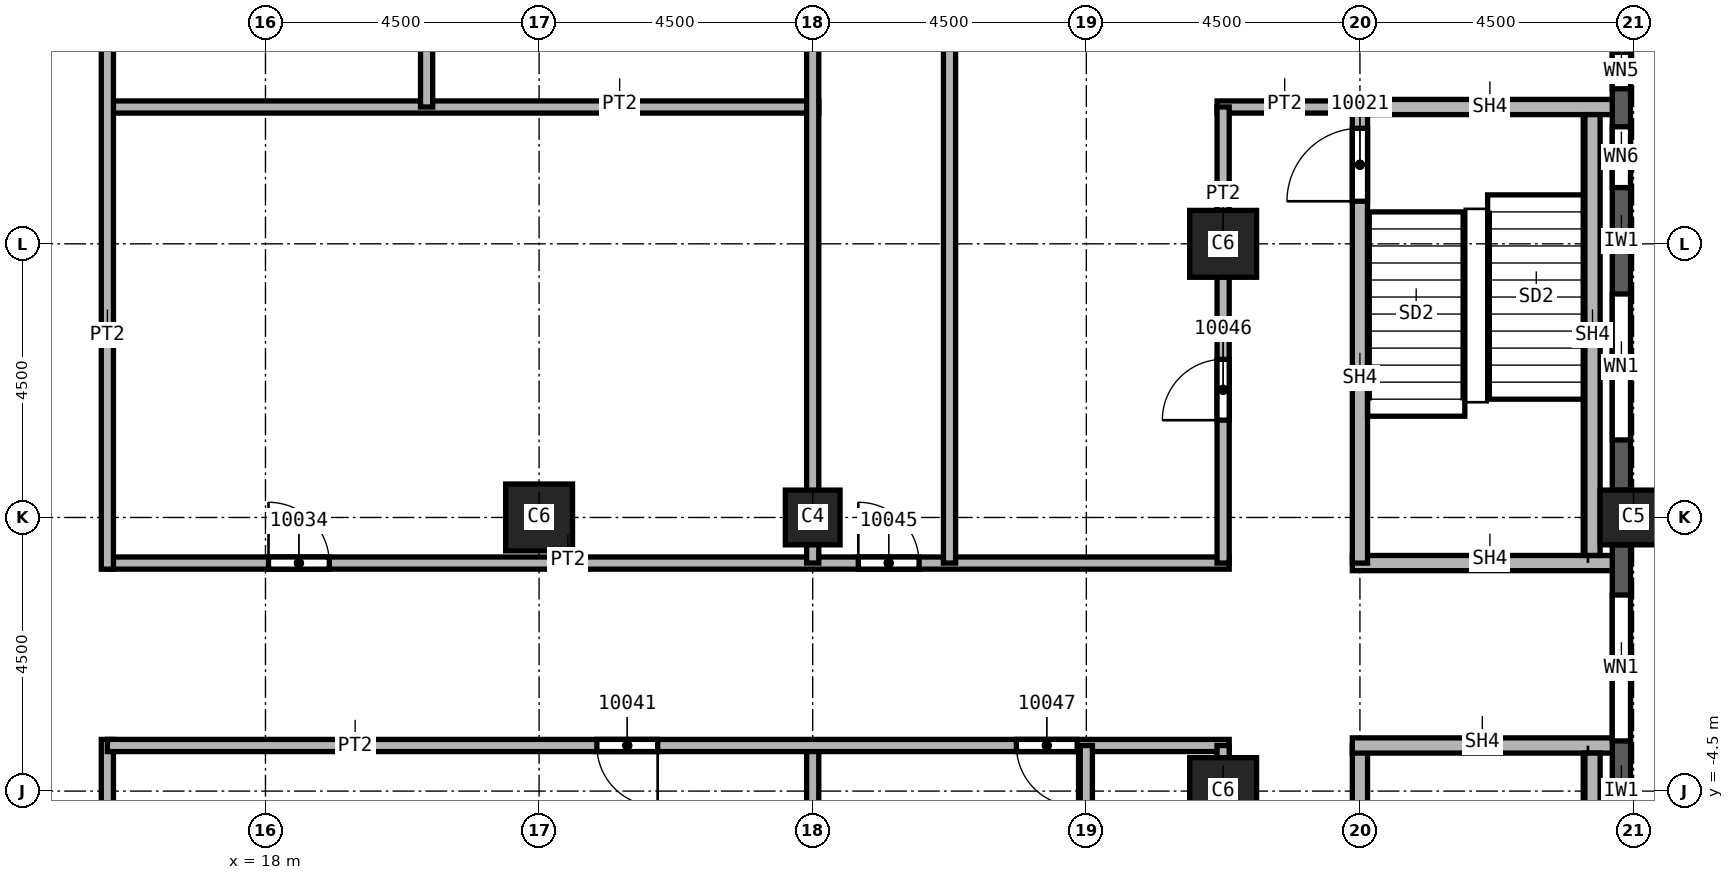
"""IFC4 building model, lengths in metres.
Left out: names, types, materials, properties, quantities, classifications, styles, units other than length and angle.
Written with IfcOpenShell. Run it as: python <this file> out.ifc"""

import sys

from ifc_helpers import new_model, si_unit, direction, frame, frame_2d, origin, origin_2d, place, context, subcontext, project, spatial, rectangle, extrude, element, fill, save


model = new_model("IFC4")
c1 = context("Model", 3, precision=1e-05, world=origin(), true_north=direction((0.0, 1.0)))
c2 = subcontext(c1, "Body", "Model", "MODEL_VIEW")
j1 = project(units=[si_unit("LENGTHUNIT", "METRE"), si_unit("PLANEANGLEUNIT", "RADIAN")], contexts=[c1])
p1 = place(None, origin())
s1 = spatial("IfcSite", under=j1, at=p1, CompositionType="ELEMENT")
p2 = place(p1, origin())
s2 = spatial("IfcBuilding", under=s1, at=p2, CompositionType="ELEMENT")
p3 = place(p2, frame((0.0, 0.0, 174.0)))
s3 = spatial("IfcBuildingStorey", under=s2, at=p3, CompositionType="ELEMENT", Elevation=174.0)
p4 = place(p3, frame((40.5, 0.0, 0.0), z_axis=(0.0, 0.0, 1.0), x_axis=(0.0, 1.0, 0.0)))
e1 = element("IfcColumn", 1, at=p4, inside=s3, PredefinedType="COLUMN", context=c2, shape_type="SweptSolid", body=[
    extrude(rectangle(XDim=0.9, YDim=1.1, at=origin_2d()), origin(), (0.0, 0.0, 1.0), 3.59),
])
for number, where, z_axis, x_axis in (
    (2, (33.75, 4.5, 0.0), (0.0, 0.0, 1.0), (1.0, 0.0, 0.0)),
    (3, (33.75, -4.5, 0.0), (0.0, 0.0, 1.0), (1.0, 0.0, 0.0)),
    (4, (22.5, 0.0, 0.0), (0.0, 0.0, 1.0), (1.0, 0.0, 0.0)),
):
    element("IfcColumn", number, at=place(p3, frame(where, z_axis=z_axis, x_axis=x_axis)), inside=s3, PredefinedType="COLUMN", context=c2, shape_type="SweptSolid", body=[
        extrude(rectangle(XDim=1.1, YDim=1.1, at=origin_2d()), origin(), (0.0, 0.0, 1.0), 3.59),
    ])
p5 = place(p3, frame((27.0, 0.0, 0.0), z_axis=(0.0, 0.0, 1.0), x_axis=(1.0, 0.0, 0.0)))
e5 = element("IfcColumn", 5, at=p5, inside=s3, PredefinedType="COLUMN", context=c2, shape_type="SweptSolid", body=[
    extrude(rectangle(XDim=0.9, YDim=0.9, at=origin_2d()), origin(), (0.0, 0.0, 1.0), 3.59),
])
p6 = place(p3, frame((40.3, -8.55, 0.0), z_axis=(0.0, 0.0, 1.0), x_axis=(0.0, 1.0, 0.0)))
e6 = element("IfcWall", 6, at=p6, inside=s3, PredefinedType="SOLIDWALL", context=c2, shape_type="SweptSolid", body=[
    extrude(rectangle(XDim=8.1, YDim=0.3, at=frame_2d((4.05, 0.0))), origin(), (0.0, 0.0, 1.0), 2.99),
])
p7 = place(p6, frame((0.825, 0.0, 0.8)))
e7 = element("IfcOpeningElement", 7, at=p7, cuts=e6, PredefinedType="OPENING", context=c2, shape_type="SweptSolid", body=[
    extrude(rectangle(XDim=2.4, YDim=1.95, at=frame_2d((1.2, 0.975))), frame((0.0, 0.15, 0.0), z_axis=(0.0, -1.0, 0.0), x_axis=(1.0, 0.0, 0.0)), (0.0, 0.0, 1.0), 0.3),
])
p8 = place(p6, frame((4.875, 0.0, 0.8)))
e8 = element("IfcOpeningElement", 8, at=p8, cuts=e6, PredefinedType="OPENING", context=c2, shape_type="SweptSolid", body=[
    extrude(rectangle(XDim=2.4, YDim=1.95, at=frame_2d((1.2, 0.975))), frame((0.0, 0.15, 0.0), z_axis=(0.0, -1.0, 0.0), x_axis=(1.0, 0.0, 0.0)), (0.0, 0.0, 1.0), 0.3),
])
p9 = place(p3, frame((40.3, 0.45, 0.0), z_axis=(0.0, 0.0, 1.0), x_axis=(0.0, 1.0, 0.0)))
e9 = element("IfcWall", 9, at=p9, inside=s3, PredefinedType="SOLIDWALL", context=c2, shape_type="SweptSolid", body=[
    extrude(rectangle(XDim=8.1, YDim=0.3, at=frame_2d((4.05, 0.0))), origin(), (0.0, 0.0, 1.0), 2.99),
])
p10 = place(p9, frame((0.825, 0.0, 0.8)))
e10 = element("IfcOpeningElement", 10, at=p10, cuts=e9, PredefinedType="OPENING", context=c2, shape_type="SweptSolid", body=[
    extrude(rectangle(XDim=2.4, YDim=1.95, at=frame_2d((1.2, 0.975))), frame((0.0, 0.15, 0.0), z_axis=(0.0, -1.0, 0.0), x_axis=(1.0, 0.0, 0.0)), (0.0, 0.0, 1.0), 0.3),
])
p11 = place(p9, frame((4.975, 0.0, 0.8)))
e11 = element("IfcOpeningElement", 11, at=p11, cuts=e9, PredefinedType="OPENING", context=c2, shape_type="SweptSolid", body=[
    extrude(rectangle(XDim=1.0, YDim=1.95, at=frame_2d((0.5, 0.975))), frame((0.0, 0.15, 0.0), z_axis=(0.0, -1.0, 0.0), x_axis=(1.0, 0.0, 0.0)), (0.0, 0.0, 1.0), 0.3),
])
p12 = place(p9, frame((6.6, 0.0, 0.8)))
e12 = element("IfcOpeningElement", 12, at=p12, cuts=e9, PredefinedType="OPENING", context=c2, shape_type="SweptSolid", body=[
    extrude(rectangle(XDim=0.6, YDim=1.95, at=frame_2d((0.3, 0.975))), frame((0.0, 0.15, 0.0), z_axis=(0.0, -1.0, 0.0), x_axis=(1.0, 0.0, 0.0)), (0.0, 0.0, 1.0), 0.3),
])
p13 = place(p3, frame((15.4, -3.65, 0.0), z_axis=(0.0, 0.0, 1.0), x_axis=(0.0, -1.0, 0.0)))
e13 = element("IfcWall", 13, at=p13, inside=s3, PredefinedType="PARTITIONING", context=c2, shape_type="SweptSolid", body=[
    extrude(rectangle(XDim=19.6, YDim=0.2, at=frame_2d((9.8, 0.0))), origin(), (0.0, 0.0, 1.0), 3.59),
])
p14 = place(p13, frame((13.0, 0.0, 0.0)))
e14 = element("IfcOpeningElement", 14, at=p14, cuts=e13, PredefinedType="OPENING", context=c2, shape_type="SweptSolid", body=[
    extrude(rectangle(XDim=1.0, YDim=2.1, at=frame_2d((0.5, 1.05))), frame((0.0, 0.1, 0.0), z_axis=(0.0, -1.0, 0.0), x_axis=(1.0, 0.0, 0.0)), (0.0, 0.0, 1.0), 0.2),
])
p15 = place(p13, frame((4.0, 0.0, 0.0)))
e15 = element("IfcOpeningElement", 15, at=p15, cuts=e13, PredefinedType="OPENING", context=c2, shape_type="SweptSolid", body=[
    extrude(rectangle(XDim=1.0, YDim=2.1, at=frame_2d((0.5, 1.05))), frame((0.0, 0.1, 0.0), z_axis=(0.0, -1.0, 0.0), x_axis=(1.0, 0.0, 0.0)), (0.0, 0.0, 1.0), 0.2),
])
p16 = place(p3, frame((15.4, -0.75, 0.0), z_axis=(0.0, 0.0, 1.0), x_axis=(1.0, 0.0, 0.0)))
e16 = element("IfcWall", 16, at=p16, inside=s3, PredefinedType="PARTITIONING", context=c2, shape_type="SweptSolid", body=[
    extrude(rectangle(XDim=18.45, YDim=0.2, at=frame_2d((9.225, 0.0))), origin(), (0.0, 0.0, 1.0), 3.59),
])
p17 = place(p16, frame((2.65, 0.0, 0.0)))
e17 = element("IfcOpeningElement", 17, at=p17, cuts=e16, PredefinedType="OPENING", context=c2, shape_type="SweptSolid", body=[
    extrude(rectangle(XDim=1.0, YDim=2.1, at=frame_2d((0.5, 1.05))), frame((0.0, 0.1, 0.0), z_axis=(0.0, -1.0, 0.0), x_axis=(1.0, 0.0, 0.0)), (0.0, 0.0, 1.0), 0.2),
])
p18 = place(p16, frame((12.35, 0.0, 0.0)))
e18 = element("IfcOpeningElement", 18, at=p18, cuts=e16, PredefinedType="OPENING", context=c2, shape_type="SweptSolid", body=[
    extrude(rectangle(XDim=1.0, YDim=2.1, at=frame_2d((0.5, 1.05))), frame((0.0, 0.1, 0.0), z_axis=(0.0, -1.0, 0.0), x_axis=(1.0, 0.0, 0.0)), (0.0, 0.0, 1.0), 0.2),
])
p19 = place(p3, frame((15.4, 6.75, 0.0), z_axis=(0.0, 0.0, 1.0), x_axis=(1.0, 0.0, 0.0)))
e19 = element("IfcWall", 19, at=p19, inside=s3, PredefinedType="PARTITIONING", context=c2, shape_type="SweptSolid", body=[
    extrude(rectangle(XDim=11.7, YDim=0.2, at=frame_2d((5.85, 0.0))), origin(), (0.0, 0.0, 1.0), 3.59),
])
p20 = place(p3, frame((15.4, 23.25, 0.0), z_axis=(0.0, 0.0, 1.0), x_axis=(0.0, -1.0, 0.0)))
e20 = element("IfcWall", 20, at=p20, inside=s3, PredefinedType="PARTITIONING", context=c2, shape_type="SweptSolid", body=[
    extrude(rectangle(XDim=24.1, YDim=0.2, at=frame_2d((12.05, 0.0))), origin(), (0.0, 0.0, 1.0), 3.59),
])
p21 = place(p20, frame((13.05, 0.0, 0.0)))
e21 = element("IfcOpeningElement", 21, at=p21, cuts=e20, PredefinedType="OPENING", context=c2, shape_type="SweptSolid", body=[
    extrude(rectangle(XDim=1.0, YDim=2.1, at=frame_2d((0.5, 1.05))), frame((0.0, 0.1, 0.0), z_axis=(0.0, -1.0, 0.0), x_axis=(1.0, 0.0, 0.0)), (0.0, 0.0, 1.0), 0.2),
])
p22 = place(p20, frame((3.1, 0.0, 0.0)))
e22 = element("IfcOpeningElement", 22, at=p22, cuts=e20, PredefinedType="OPENING", context=c2, shape_type="SweptSolid", body=[
    extrude(rectangle(XDim=1.0, YDim=2.1, at=frame_2d((0.5, 1.05))), frame((0.0, 0.1, 0.0), z_axis=(0.0, -1.0, 0.0), x_axis=(1.0, 0.0, 0.0)), (0.0, 0.0, 1.0), 0.2),
])
p23 = place(p3, frame((20.65, 18.1, 0.0), z_axis=(0.0, 0.0, 1.0), x_axis=(0.0, -1.0, 0.0)))
e23 = element("IfcWall", 23, at=p23, inside=s3, PredefinedType="PARTITIONING", context=c2, shape_type="SweptSolid", body=[
    extrude(rectangle(XDim=11.35, YDim=0.2, at=frame_2d((5.675, 0.0))), origin(), (0.0, 0.0, 1.0), 3.59),
])
p24 = place(p23, frame((7.0, 0.0, 0.0)))
e24 = element("IfcOpeningElement", 24, at=p24, cuts=e23, PredefinedType="OPENING", context=c2, shape_type="SweptSolid", body=[
    extrude(rectangle(XDim=1.0, YDim=2.1, at=frame_2d((0.5, 1.05))), frame((0.0, 0.1, 0.0), z_axis=(0.0, -1.0, 0.0), x_axis=(1.0, 0.0, 0.0)), (0.0, 0.0, 1.0), 0.2),
])
p25 = place(p3, frame((27.0, -3.75, 0.0), z_axis=(0.0, 0.0, 1.0), x_axis=(0.0, -1.0, 0.0)))
e25 = element("IfcWall", 25, at=p25, inside=s3, PredefinedType="PARTITIONING", context=c2, shape_type="SweptSolid", body=[
    extrude(rectangle(XDim=13.7, YDim=0.2, at=frame_2d((6.85, 0.0))), origin(), (0.0, 0.0, 1.0), 3.59),
])
p26 = place(p3, frame((27.0, 17.45, 0.0), z_axis=(0.0, 0.0, 1.0), x_axis=(0.0, -1.0, 0.0)))
e26 = element("IfcWall", 26, at=p26, inside=s3, PredefinedType="PARTITIONING", context=c2, shape_type="SweptSolid", body=[
    extrude(rectangle(XDim=18.2, YDim=0.2, at=frame_2d((9.1, 0.0))), origin(), (0.0, 0.0, 1.0), 3.59),
])
p27 = place(p3, frame((33.85, -3.75, 0.0), z_axis=(0.0, 0.0, 1.0), x_axis=(-1.0, 0.0, 0.0)))
e27 = element("IfcWall", 27, at=p27, inside=s3, PredefinedType="PARTITIONING", context=c2, shape_type="SweptSolid", body=[
    extrude(rectangle(XDim=18.45, YDim=0.2, at=frame_2d((9.225, 0.0))), origin(), (0.0, 0.0, 1.0), 3.59),
])
p28 = place(p27, frame((9.4, 0.0, 0.0)))
e28 = element("IfcOpeningElement", 28, at=p28, cuts=e27, PredefinedType="OPENING", context=c2, shape_type="SweptSolid", body=[
    extrude(rectangle(XDim=1.0, YDim=2.1, at=frame_2d((0.5, 1.05))), frame((0.0, 0.1, 0.0), z_axis=(0.0, -1.0, 0.0), x_axis=(1.0, 0.0, 0.0)), (0.0, 0.0, 1.0), 0.2),
])
p29 = place(p27, frame((2.5, 0.0, 0.0)))
e29 = element("IfcOpeningElement", 29, at=p29, cuts=e27, PredefinedType="OPENING", context=c2, shape_type="SweptSolid", body=[
    extrude(rectangle(XDim=1.0, YDim=2.1, at=frame_2d((0.5, 1.05))), frame((0.0, 0.1, 0.0), z_axis=(0.0, -1.0, 0.0), x_axis=(1.0, 0.0, 0.0)), (0.0, 0.0, 1.0), 0.2),
])
p30 = place(p3, frame((29.25, 17.65, 0.0), z_axis=(0.0, 0.0, 1.0), x_axis=(0.0, -1.0, 0.0)))
e30 = element("IfcWall", 30, at=p30, inside=s3, PredefinedType="PARTITIONING", context=c2, shape_type="SweptSolid", body=[
    extrude(rectangle(XDim=18.4, YDim=0.2, at=frame_2d((9.2, 0.0))), origin(), (0.0, 0.0, 1.0), 3.59),
])
p31 = place(p3, frame((31.5, -3.75, 0.0), z_axis=(0.0, 0.0, 1.0), x_axis=(0.0, -1.0, 0.0)))
e31 = element("IfcWall", 31, at=p31, inside=s3, PredefinedType="PARTITIONING", context=c2, shape_type="SweptSolid", body=[
    extrude(rectangle(XDim=13.7, YDim=0.2, at=frame_2d((6.85, 0.0))), origin(), (0.0, 0.0, 1.0), 3.59),
])
p32 = place(p3, frame((33.65, 6.75, 0.0), z_axis=(0.0, 0.0, 1.0), x_axis=(1.0, 0.0, 0.0)))
e32 = element("IfcWall", 32, at=p32, inside=s3, PredefinedType="PARTITIONING", context=c2, shape_type="SweptSolid", body=[
    extrude(rectangle(XDim=2.35, YDim=0.2, at=frame_2d((1.175, 0.0))), origin(), (0.0, 0.0, 1.0), 3.59),
])
p33 = place(p3, frame((33.75, -11.25, 0.0), z_axis=(0.0, 0.0, 1.0), x_axis=(0.0, 1.0, 0.0)))
e33 = element("IfcWall", 33, at=p33, inside=s3, PredefinedType="PARTITIONING", context=c2, shape_type="SweptSolid", body=[
    extrude(rectangle(XDim=7.5, YDim=0.2, at=frame_2d((3.75, 0.0))), origin(), (0.0, 0.0, 1.0), 3.59),
])
p34 = place(p33, frame((0.55, 0.0, 0.0)))
e34 = element("IfcOpeningElement", 34, at=p34, cuts=e33, PredefinedType="OPENING", context=c2, shape_type="SweptSolid", body=[
    extrude(rectangle(XDim=1.0, YDim=2.1, at=frame_2d((0.5, 1.05))), frame((0.0, 0.1, 0.0), z_axis=(0.0, -1.0, 0.0), x_axis=(1.0, 0.0, 0.0)), (0.0, 0.0, 1.0), 0.2),
])
p35 = place(p3, frame((33.75, -0.75, 0.0), z_axis=(0.0, 0.0, 1.0), x_axis=(0.0, 1.0, 0.0)))
e35 = element("IfcWall", 35, at=p35, inside=s3, PredefinedType="PARTITIONING", context=c2, shape_type="SweptSolid", body=[
    extrude(rectangle(XDim=7.5, YDim=0.2, at=frame_2d((3.75, 0.0))), origin(), (0.0, 0.0, 1.0), 3.59),
])
p36 = place(p35, frame((2.35, 0.0, 0.0)))
e36 = element("IfcOpeningElement", 36, at=p36, cuts=e35, PredefinedType="OPENING", context=c2, shape_type="SweptSolid", body=[
    extrude(rectangle(XDim=1.0, YDim=2.1, at=frame_2d((0.5, 1.05))), frame((0.0, 0.1, 0.0), z_axis=(0.0, -1.0, 0.0), x_axis=(1.0, 0.0, 0.0)), (0.0, 0.0, 1.0), 0.2),
])
p37 = place(p3, frame((35.875, -0.75, 0.0), z_axis=(0.0, 0.0, 1.0), x_axis=(1.0, 0.0, 0.0)))
e37 = element("IfcWall", 37, at=p37, inside=s3, PredefinedType="SOLIDWALL", context=c2, shape_type="SweptSolid", body=[
    extrude(rectangle(XDim=4.275, YDim=0.25, at=frame_2d((2.137, 0.0))), origin(), (0.0, 0.0, 1.0), 3.59),
])
p38 = place(p3, frame((36.0, -11.375, 0.0), z_axis=(0.0, 0.0, 1.0), x_axis=(0.0, 1.0, 0.0)))
e38 = element("IfcWall", 38, at=p38, inside=s3, PredefinedType="SOLIDWALL", context=c2, shape_type="SweptSolid", body=[
    extrude(rectangle(XDim=7.625, YDim=0.25, at=frame_2d((3.812, 0.0))), origin(), (0.0, 0.0, 1.0), 3.59),
])
p39 = place(p38, frame((0.4, 0.0, 0.0)))
e39 = element("IfcOpeningElement", 39, at=p39, cuts=e38, PredefinedType="OPENING", context=c2, shape_type="SweptSolid", body=[
    extrude(rectangle(XDim=1.2, YDim=2.1, at=frame_2d((0.6, 1.05))), frame((0.0, 0.125, 0.0), z_axis=(0.0, -1.0, 0.0), x_axis=(1.0, 0.0, 0.0)), (0.0, 0.0, 1.0), 0.25),
])
p40 = place(p3, frame((36.0, -0.75, 0.0), z_axis=(0.0, 0.0, 1.0), x_axis=(0.0, 1.0, 0.0)))
e40 = element("IfcWall", 40, at=p40, inside=s3, PredefinedType="SOLIDWALL", context=c2, shape_type="SweptSolid", body=[
    extrude(rectangle(XDim=7.625, YDim=0.25, at=frame_2d((3.812, 0.0))), origin(), (0.0, 0.0, 1.0), 3.59),
])
p41 = place(p40, frame((5.95, 0.0, 0.0)))
e41 = element("IfcOpeningElement", 41, at=p41, cuts=e40, PredefinedType="OPENING", context=c2, shape_type="SweptSolid", body=[
    extrude(rectangle(XDim=1.2, YDim=2.1, at=frame_2d((0.6, 1.05))), frame((0.0, 0.125, 0.0), z_axis=(0.0, -1.0, 0.0), x_axis=(1.0, 0.0, 0.0)), (0.0, 0.0, 1.0), 0.25),
])
p42 = place(p3, frame((36.0, 6.75, 0.0), z_axis=(0.0, 0.0, 1.0), x_axis=(1.0, 0.0, 0.0)))
e42 = element("IfcWall", 42, at=p42, inside=s3, PredefinedType="SOLIDWALL", context=c2, shape_type="SweptSolid", body=[
    extrude(rectangle(XDim=4.15, YDim=0.25, at=frame_2d((2.075, 0.0))), origin(), (0.0, 0.0, 1.0), 3.59),
])
p43 = place(p3, frame((40.15, -3.75, 0.0), z_axis=(0.0, 0.0, 1.0), x_axis=(-1.0, 0.0, 0.0)))
e43 = element("IfcWall", 43, at=p43, inside=s3, PredefinedType="SOLIDWALL", context=c2, shape_type="SweptSolid", body=[
    extrude(rectangle(XDim=4.275, YDim=0.25, at=frame_2d((2.137, 0.0))), origin(), (0.0, 0.0, 1.0), 3.59),
])
for number, where, z_axis, x_axis in (
    (44, (39.825, -11.125, 0.0), (0.0, 0.0, 1.0), (0.0, 1.0, 0.0)),
    (45, (39.825, -0.625, 0.0), (0.0, 0.0, 1.0), (0.0, 1.0, 0.0)),
):
    element("IfcWall", number, at=place(p3, frame(where, z_axis=z_axis, x_axis=x_axis)), inside=s3, PredefinedType="SOLIDWALL", context=c2, shape_type="SweptSolid", body=[
        extrude(rectangle(XDim=7.25, YDim=0.25, at=frame_2d((3.625, 0.0))), origin(), (0.0, 0.0, 1.0), 3.59),
    ])
p44 = place(p8, origin())
e46 = element("IfcWindow", 46, at=p44, inside=s3, PartitioningType="SINGLE_PANEL", PredefinedType="WINDOW", context=c2, shape_type="SweptSolid", body=[
    extrude(rectangle(XDim=2.4, YDim=1.95, at=frame_2d((1.2, 0.975))), frame((0.0, 0.03, 0.0), z_axis=(0.0, -1.0, 0.0), x_axis=(1.0, 0.0, 0.0)), (0.0, 0.0, 1.0), 0.06),
])
fill(e8, e46)
p45 = place(p10, origin())
e47 = element("IfcWindow", 47, at=p45, inside=s3, PartitioningType="SINGLE_PANEL", PredefinedType="WINDOW", context=c2, shape_type="SweptSolid", body=[
    extrude(rectangle(XDim=2.4, YDim=1.95, at=frame_2d((1.2, 0.975))), frame((0.0, 0.03, 0.0), z_axis=(0.0, -1.0, 0.0), x_axis=(1.0, 0.0, 0.0)), (0.0, 0.0, 1.0), 0.06),
])
fill(e10, e47)
p46 = place(p41, origin())
e48 = element("IfcDoor", 48, at=p46, inside=s3, OperationType="SINGLE_SWING_RIGHT", PredefinedType="DOOR", context=c2, shape_type="SweptSolid", body=[
    extrude(rectangle(XDim=1.2, YDim=2.1, at=frame_2d((0.6, 1.05))), frame((0.0, 0.025, 0.0), z_axis=(0.0, -1.0, 0.0), x_axis=(1.0, 0.0, 0.0)), (0.0, 0.0, 1.0), 0.05),
])
fill(e41, e48)
p47 = place(p17, origin())
e49 = element("IfcDoor", 49, at=p47, inside=s3, OperationType="SINGLE_SWING_LEFT", PredefinedType="DOOR", context=c2, shape_type="SweptSolid", body=[
    extrude(rectangle(XDim=1.0, YDim=2.1, at=frame_2d((0.5, 1.05))), frame((0.0, 0.025, 0.0), z_axis=(0.0, -1.0, 0.0), x_axis=(1.0, 0.0, 0.0)), (0.0, 0.0, 1.0), 0.05),
])
fill(e17, e49)
p48 = place(p28, origin())
e50 = element("IfcDoor", 50, at=p48, inside=s3, OperationType="SINGLE_SWING_RIGHT", PredefinedType="DOOR", context=c2, shape_type="SweptSolid", body=[
    extrude(rectangle(XDim=1.0, YDim=2.1, at=frame_2d((0.5, 1.05))), frame((0.0, 0.025, 0.0), z_axis=(0.0, -1.0, 0.0), x_axis=(1.0, 0.0, 0.0)), (0.0, 0.0, 1.0), 0.05),
])
fill(e28, e50)
p49 = place(p18, origin())
e51 = element("IfcDoor", 51, at=p49, inside=s3, OperationType="SINGLE_SWING_RIGHT", PredefinedType="DOOR", context=c2, shape_type="SweptSolid", body=[
    extrude(rectangle(XDim=1.0, YDim=2.1, at=frame_2d((0.5, 1.05))), frame((0.0, 0.025, 0.0), z_axis=(0.0, -1.0, 0.0), x_axis=(1.0, 0.0, 0.0)), (0.0, 0.0, 1.0), 0.05),
])
fill(e18, e51)
p50 = place(p36, origin())
e52 = element("IfcDoor", 52, at=p50, inside=s3, OperationType="SINGLE_SWING_LEFT", PredefinedType="DOOR", context=c2, shape_type="SweptSolid", body=[
    extrude(rectangle(XDim=1.0, YDim=2.1, at=frame_2d((0.5, 1.05))), frame((0.0, 0.025, 0.0), z_axis=(0.0, -1.0, 0.0), x_axis=(1.0, 0.0, 0.0)), (0.0, 0.0, 1.0), 0.05),
])
fill(e36, e52)
p51 = place(p29, origin())
e53 = element("IfcDoor", 53, at=p51, inside=s3, OperationType="SINGLE_SWING_RIGHT", PredefinedType="DOOR", context=c2, shape_type="SweptSolid", body=[
    extrude(rectangle(XDim=1.0, YDim=2.1, at=frame_2d((0.5, 1.05))), frame((0.0, 0.025, 0.0), z_axis=(0.0, -1.0, 0.0), x_axis=(1.0, 0.0, 0.0)), (0.0, 0.0, 1.0), 0.05),
])
fill(e29, e53)
p52 = place(p11, origin())
e54 = element("IfcWindow", 54, at=p52, inside=s3, PartitioningType="SINGLE_PANEL", PredefinedType="WINDOW", context=c2, shape_type="SweptSolid", body=[
    extrude(rectangle(XDim=1.0, YDim=1.95, at=frame_2d((0.5, 0.975))), frame((0.0, 0.03, 0.0), z_axis=(0.0, -1.0, 0.0), x_axis=(1.0, 0.0, 0.0)), (0.0, 0.0, 1.0), 0.06),
])
fill(e11, e54)
p53 = place(p12, origin())
e55 = element("IfcWindow", 55, at=p53, inside=s3, PartitioningType="SINGLE_PANEL", PredefinedType="WINDOW", context=c2, shape_type="SweptSolid", body=[
    extrude(rectangle(XDim=0.6, YDim=1.95, at=frame_2d((0.3, 0.975))), frame((0.0, 0.03, 0.0), z_axis=(0.0, -1.0, 0.0), x_axis=(1.0, 0.0, 0.0)), (0.0, 0.0, 1.0), 0.06),
])
fill(e12, e55)
save(model, sys.argv[1])
